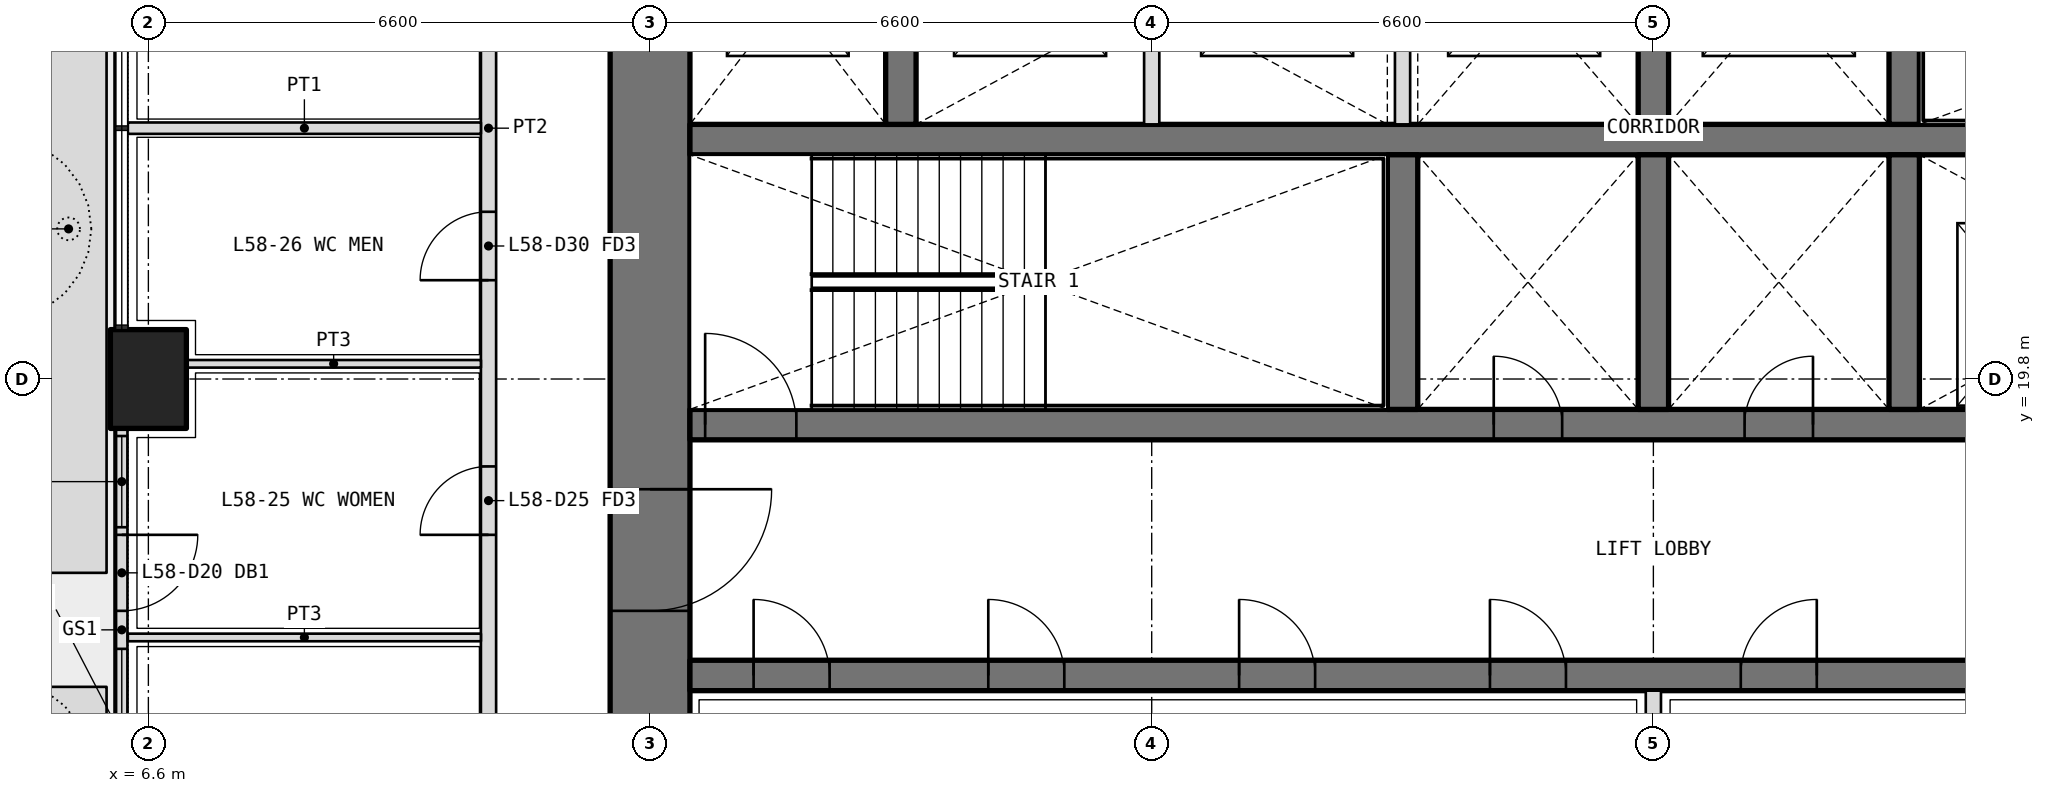
"""IFC4 building model, lengths in metres.
Left out: names, types, materials, properties, quantities, classifications, styles, units other than length and angle.
Written with IfcOpenShell. Run it as: python <this file> out.ifc"""

import sys

from ifc_helpers import new_model, si_unit, direction, frame, frame_2d, origin, origin_2d, place, context, subcontext, project, spatial, polyline, rectangle, outline, extrude, element, fill, save


model = new_model("IFC4")
c1 = context("Model", 3, precision=1e-05, world=origin(), true_north=direction((0.0, 1.0)))
c2 = subcontext(c1, "Body", "Model", "MODEL_VIEW")
j1 = project(units=[si_unit("LENGTHUNIT", "METRE"), si_unit("PLANEANGLEUNIT", "RADIAN")], contexts=[c1])
p1 = place(None, origin())
s1 = spatial("IfcSite", under=j1, at=p1, CompositionType="ELEMENT")
p2 = place(p1, origin())
s2 = spatial("IfcBuilding", under=s1, at=p2, CompositionType="ELEMENT")
p3 = place(p2, frame((0.0, 0.0, 254.4)))
s3 = spatial("IfcBuildingStorey", under=s2, at=p3, CompositionType="ELEMENT", Elevation=254.4)
p4 = place(p3, frame((6.6, 19.8, 0.0), z_axis=(0.0, 0.0, 1.0), x_axis=(0.0, 1.0, 0.0)))
e1 = element("IfcColumn", 1, at=p4, inside=s3, PredefinedType="COLUMN", context=c2, shape_type="SweptSolid", body=[
    extrude(rectangle(XDim=1.3, YDim=1.0, at=origin_2d()), origin(), (0.0, 0.0, 1.0), 4.2),
])
p5 = place(p3, origin())
e2 = element("IfcWall", 2, at=p5, inside=s3, PredefinedType="USERDEFINED", context=c2, shape_type="SweptSolid", body=[
    extrude(outline(polyline([(5.05, 13.3), (6.05, 13.3), (6.05, 15.75), (5.05, 15.75), (5.05, 13.3)]), holes=[polyline([(5.2, 13.45), (5.9, 13.45), (5.9, 15.6), (5.2, 15.6), (5.2, 13.45)])]), origin(), (0.0, 0.0, 1.0), 1.05),
])
p6 = place(p3, origin())
e3 = element("IfcWall", 3, at=p6, inside=s3, PredefinedType="USERDEFINED", context=c2, shape_type="SweptSolid", body=[
    extrude(outline(polyline([(5.05, 17.25), (6.05, 17.25), (6.05, 26.3), (5.05, 26.3), (5.05, 17.25)]), holes=[polyline([(5.2, 17.4), (5.9, 17.4), (5.9, 26.15), (5.2, 26.15), (5.2, 17.4)])]), origin(), (0.0, 0.0, 1.0), 1.05),
])
p7 = place(p3, frame((6.25, 19.15, 0.0), z_axis=(0.0, 0.0, 1.0), x_axis=(0.0, -1.0, 0.0)))
e4 = element("IfcWall", 4, at=p7, inside=s3, PredefinedType="SOLIDWALL", context=c2, shape_type="SweptSolid", body=[
    extrude(rectangle(XDim=5.3, YDim=0.15, at=frame_2d((2.65, 0.0))), origin(), (0.0, 0.0, 1.0), 2.7),
])
p8 = place(p7, frame((1.4, 0.0, 0.0)))
e5 = element("IfcOpeningElement", 5, at=p8, cuts=e4, PredefinedType="OPENING", context=c2, shape_type="SweptSolid", body=[
    extrude(rectangle(XDim=1.0, YDim=2.4, at=frame_2d((0.5, 1.2))), frame((0.0, 0.085, 0.0), z_axis=(0.0, -1.0, 0.0), x_axis=(1.0, 0.0, 0.0)), (0.0, 0.0, 1.0), 0.17),
])
p9 = place(p7, frame((0.1, 0.0, 0.1)))
e6 = element("IfcOpeningElement", 6, at=p9, cuts=e4, PredefinedType="OPENING", context=c2, shape_type="SweptSolid", body=[
    extrude(rectangle(XDim=1.2, YDim=2.3, at=frame_2d((0.6, 1.15))), frame((0.0, 0.085, 0.0), z_axis=(0.0, -1.0, 0.0), x_axis=(1.0, 0.0, 0.0)), (0.0, 0.0, 1.0), 0.17),
])
p10 = place(p7, frame((2.9, 0.0, 0.1)))
e7 = element("IfcOpeningElement", 7, at=p10, cuts=e4, PredefinedType="OPENING", context=c2, shape_type="SweptSolid", body=[
    extrude(rectangle(XDim=2.3, YDim=2.3, at=frame_2d((1.15, 1.15))), frame((0.0, 0.085, 0.0), z_axis=(0.0, -1.0, 0.0), x_axis=(1.0, 0.0, 0.0)), (0.0, 0.0, 1.0), 0.17),
])
p11 = place(p3, frame((13.2, 32.475, 0.0), z_axis=(0.0, 0.0, 1.0), x_axis=(0.0, -1.0, 0.0)))
e8 = element("IfcWall", 8, at=p11, inside=s3, PredefinedType="SHEAR", context=c2, shape_type="SweptSolid", body=[
    extrude(rectangle(XDim=18.75, YDim=1.05, at=frame_2d((9.375, 0.0))), origin(), (0.0, 0.0, 1.0), 4.2),
])
p12 = place(p11, frame((14.125, 0.0, 0.0)))
e9 = element("IfcOpeningElement", 9, at=p12, cuts=e8, PredefinedType="OPENING", context=c2, shape_type="SweptSolid", body=[
    extrude(rectangle(XDim=1.6, YDim=2.1, at=frame_2d((0.8, 1.05))), frame((0.0, 0.535, 0.0), z_axis=(0.0, -1.0, 0.0), x_axis=(1.0, 0.0, 0.0)), (0.0, 0.0, 1.0), 1.07),
])
p13 = place(p11, frame((3.325, 0.0, 0.0)))
e10 = element("IfcOpeningElement", 10, at=p13, cuts=e8, PredefinedType="OPENING", context=c2, shape_type="SweptSolid", body=[
    extrude(rectangle(XDim=1.6, YDim=2.1, at=frame_2d((0.8, 1.05))), frame((0.0, 0.535, 0.0), z_axis=(0.0, -1.0, 0.0), x_axis=(1.0, 0.0, 0.0)), (0.0, 0.0, 1.0), 1.07),
])
p14 = place(p3, frame((13.725, 15.9, 0.0), z_axis=(0.0, 0.0, 1.0), x_axis=(1.0, 0.0, 0.0)))
e11 = element("IfcWall", 11, at=p14, inside=s3, PredefinedType="SHEAR", context=c2, shape_type="SweptSolid", body=[
    extrude(rectangle(XDim=25.35, YDim=0.4, at=frame_2d((12.675, 0.0))), origin(), (0.0, 0.0, 1.0), 4.2),
])
p15 = place(p14, frame((0.837, 0.0, 0.0)))
e12 = element("IfcOpeningElement", 12, at=p15, cuts=e11, PredefinedType="OPENING", context=c2, shape_type="SweptSolid", body=[
    extrude(rectangle(XDim=1.0, YDim=2.1, at=frame_2d((0.5, 1.05))), frame((0.0, 0.21, 0.0), z_axis=(0.0, -1.0, 0.0), x_axis=(1.0, 0.0, 0.0)), (0.0, 0.0, 1.0), 0.42),
])
p16 = place(p14, frame((3.925, 0.0, 0.0)))
e13 = element("IfcOpeningElement", 13, at=p16, cuts=e11, PredefinedType="OPENING", context=c2, shape_type="SweptSolid", body=[
    extrude(rectangle(XDim=1.0, YDim=2.1, at=frame_2d((0.5, 1.05))), frame((0.0, 0.21, 0.0), z_axis=(0.0, -1.0, 0.0), x_axis=(1.0, 0.0, 0.0)), (0.0, 0.0, 1.0), 0.42),
])
p17 = place(p14, frame((7.225, 0.0, 0.0)))
e14 = element("IfcOpeningElement", 14, at=p17, cuts=e11, PredefinedType="OPENING", context=c2, shape_type="SweptSolid", body=[
    extrude(rectangle(XDim=1.0, YDim=2.1, at=frame_2d((0.5, 1.05))), frame((0.0, 0.21, 0.0), z_axis=(0.0, -1.0, 0.0), x_axis=(1.0, 0.0, 0.0)), (0.0, 0.0, 1.0), 0.42),
])
p18 = place(p14, frame((10.525, 0.0, 0.0)))
e15 = element("IfcOpeningElement", 15, at=p18, cuts=e11, PredefinedType="OPENING", context=c2, shape_type="SweptSolid", body=[
    extrude(rectangle(XDim=1.0, YDim=2.1, at=frame_2d((0.5, 1.05))), frame((0.0, 0.21, 0.0), z_axis=(0.0, -1.0, 0.0), x_axis=(1.0, 0.0, 0.0)), (0.0, 0.0, 1.0), 0.42),
])
p19 = place(p14, frame((13.825, 0.0, 0.0)))
e16 = element("IfcOpeningElement", 16, at=p19, cuts=e11, PredefinedType="OPENING", context=c2, shape_type="SweptSolid", body=[
    extrude(rectangle(XDim=1.0, YDim=2.1, at=frame_2d((0.5, 1.05))), frame((0.0, 0.21, 0.0), z_axis=(0.0, -1.0, 0.0), x_axis=(1.0, 0.0, 0.0)), (0.0, 0.0, 1.0), 0.42),
])
p20 = place(p14, frame((17.125, 0.0, 0.0)))
e17 = element("IfcOpeningElement", 17, at=p20, cuts=e11, PredefinedType="OPENING", context=c2, shape_type="SweptSolid", body=[
    extrude(rectangle(XDim=1.0, YDim=2.1, at=frame_2d((0.5, 1.05))), frame((0.0, 0.21, 0.0), z_axis=(0.0, -1.0, 0.0), x_axis=(1.0, 0.0, 0.0)), (0.0, 0.0, 1.0), 0.42),
])
p21 = place(p14, frame((20.425, 0.0, 0.0)))
e18 = element("IfcOpeningElement", 18, at=p21, cuts=e11, PredefinedType="OPENING", context=c2, shape_type="SweptSolid", body=[
    extrude(rectangle(XDim=1.0, YDim=2.1, at=frame_2d((0.5, 1.05))), frame((0.0, 0.21, 0.0), z_axis=(0.0, -1.0, 0.0), x_axis=(1.0, 0.0, 0.0)), (0.0, 0.0, 1.0), 0.42),
])
p22 = place(p14, frame((23.512, 0.0, 0.0)))
e19 = element("IfcOpeningElement", 19, at=p22, cuts=e11, PredefinedType="OPENING", context=c2, shape_type="SweptSolid", body=[
    extrude(rectangle(XDim=1.0, YDim=2.1, at=frame_2d((0.5, 1.05))), frame((0.0, 0.21, 0.0), z_axis=(0.0, -1.0, 0.0), x_axis=(1.0, 0.0, 0.0)), (0.0, 0.0, 1.0), 0.42),
])
p23 = place(p3, frame((13.725, 19.2, 0.0), z_axis=(0.0, 0.0, 1.0), x_axis=(1.0, 0.0, 0.0)))
e20 = element("IfcWall", 20, at=p23, inside=s3, PredefinedType="SHEAR", context=c2, shape_type="SweptSolid", body=[
    extrude(rectangle(XDim=25.35, YDim=0.4, at=frame_2d((12.675, 0.0))), origin(), (0.0, 0.0, 1.0), 4.2),
])
p24 = place(p23, frame((10.575, 0.0, 0.0)))
e21 = element("IfcOpeningElement", 21, at=p24, cuts=e20, PredefinedType="OPENING", context=c2, shape_type="SweptSolid", body=[
    extrude(rectangle(XDim=0.9, YDim=2.1, at=frame_2d((0.45, 1.05))), frame((0.0, 0.21, 0.0), z_axis=(0.0, -1.0, 0.0), x_axis=(1.0, 0.0, 0.0)), (0.0, 0.0, 1.0), 0.42),
])
p25 = place(p23, frame((13.875, 0.0, 0.0)))
e22 = element("IfcOpeningElement", 22, at=p25, cuts=e20, PredefinedType="OPENING", context=c2, shape_type="SweptSolid", body=[
    extrude(rectangle(XDim=0.9, YDim=2.1, at=frame_2d((0.45, 1.05))), frame((0.0, 0.21, 0.0), z_axis=(0.0, -1.0, 0.0), x_axis=(1.0, 0.0, 0.0)), (0.0, 0.0, 1.0), 0.42),
])
p26 = place(p23, frame((0.2, 0.0, 0.0)))
e23 = element("IfcOpeningElement", 23, at=p26, cuts=e20, PredefinedType="OPENING", context=c2, shape_type="SweptSolid", body=[
    extrude(rectangle(XDim=1.2, YDim=2.1, at=frame_2d((0.6, 1.05))), frame((0.0, 0.21, 0.0), z_axis=(0.0, -1.0, 0.0), x_axis=(1.0, 0.0, 0.0)), (0.0, 0.0, 1.0), 0.42),
])
p27 = place(p23, frame((23.512, 0.0, 0.0)))
e24 = element("IfcOpeningElement", 24, at=p27, cuts=e20, PredefinedType="OPENING", context=c2, shape_type="SweptSolid", body=[
    extrude(rectangle(XDim=1.1, YDim=2.1, at=frame_2d((0.55, 1.05))), frame((0.0, 0.21, 0.0), z_axis=(0.0, -1.0, 0.0), x_axis=(1.0, 0.0, 0.0)), (0.0, 0.0, 1.0), 0.42),
])
p28 = place(p23, frame((17.125, 0.0, 0.0)))
e25 = element("IfcOpeningElement", 25, at=p28, cuts=e20, PredefinedType="OPENING", context=c2, shape_type="SweptSolid", body=[
    extrude(rectangle(XDim=1.1, YDim=2.1, at=frame_2d((0.55, 1.05))), frame((0.0, 0.21, 0.0), z_axis=(0.0, -1.0, 0.0), x_axis=(1.0, 0.0, 0.0)), (0.0, 0.0, 1.0), 0.42),
])
p29 = place(p23, frame((20.325, 0.0, 0.0)))
e26 = element("IfcOpeningElement", 26, at=p29, cuts=e20, PredefinedType="OPENING", context=c2, shape_type="SweptSolid", body=[
    extrude(rectangle(XDim=1.1, YDim=2.1, at=frame_2d((0.55, 1.05))), frame((0.0, 0.21, 0.0), z_axis=(0.0, -1.0, 0.0), x_axis=(1.0, 0.0, 0.0)), (0.0, 0.0, 1.0), 0.42),
])
p30 = place(p3, frame((13.725, 22.95, 0.0), z_axis=(0.0, 0.0, 1.0), x_axis=(1.0, 0.0, 0.0)))
e27 = element("IfcWall", 27, at=p30, inside=s3, PredefinedType="SHEAR", context=c2, shape_type="SweptSolid", body=[
    extrude(rectangle(XDim=25.35, YDim=0.4, at=frame_2d((12.675, 0.0))), origin(), (0.0, 0.0, 1.0), 4.2),
])
for number, where, z_axis, x_axis in (
    (28, (23.1, 19.4, 0.0), (0.0, 0.0, 1.0), (0.0, 1.0, 0.0)),
    (29, (26.4, 19.4, 0.0), (0.0, 0.0, 1.0), (0.0, 1.0, 0.0)),
    (30, (29.7, 19.4, 0.0), (0.0, 0.0, 1.0), (0.0, 1.0, 0.0)),
    (31, (16.5, 23.15, 0.0), (0.0, 0.0, 1.0), (0.0, 1.0, 0.0)),
    (32, (26.4, 23.15, 0.0), (0.0, 0.0, 1.0), (0.0, 1.0, 0.0)),
    (33, (29.7, 23.15, 0.0), (0.0, 0.0, 1.0), (0.0, 1.0, 0.0)),
):
    element("IfcWall", number, at=place(p3, frame(where, z_axis=z_axis, x_axis=x_axis)), inside=s3, PredefinedType="SHEAR", context=c2, shape_type="SweptSolid", body=[
        extrude(rectangle(XDim=3.35, YDim=0.4, at=frame_2d((1.675, 0.0))), origin(), (0.0, 0.0, 1.0), 4.2),
    ])
p31 = place(p3, frame((26.4, 13.725, 0.0), z_axis=(0.0, 0.0, 1.0), x_axis=(0.0, 1.0, 0.0)))
e34 = element("IfcWall", 34, at=p31, inside=s3, PredefinedType="PARTITIONING", context=c2, shape_type="SweptSolid", body=[
    extrude(rectangle(XDim=1.975, YDim=0.2, at=frame_2d((0.987, 0.0))), origin(), (0.0, 0.0, 1.0), 4.2),
])
for number, where, z_axis, x_axis in (
    (35, (19.8, 23.15, 0.0), (0.0, 0.0, 1.0), (0.0, 1.0, 0.0)),
    (36, (23.1, 23.15, 0.0), (0.0, 0.0, 1.0), (0.0, 1.0, 0.0)),
):
    element("IfcWall", number, at=place(p3, frame(where, z_axis=z_axis, x_axis=x_axis)), inside=s3, PredefinedType="PARTITIONING", context=c2, shape_type="SweptSolid", body=[
        extrude(rectangle(XDim=3.35, YDim=0.2, at=frame_2d((1.675, 0.0))), origin(), (0.0, 0.0, 1.0), 4.2),
    ])
p32 = place(p3, frame((11.075, 7.4, 0.0), z_axis=(0.0, 0.0, 1.0), x_axis=(0.0, 1.0, 0.0)))
e37 = element("IfcWall", 37, at=p32, inside=s3, PredefinedType="PARTITIONING", context=c2, shape_type="SweptSolid", body=[
    extrude(rectangle(XDim=31.4, YDim=0.2, at=frame_2d((15.7, 0.0))), origin(), (0.0, 0.0, 1.0), 3.0),
])
p33 = place(p32, frame((2.35, 0.0, 0.0)))
e38 = element("IfcOpeningElement", 38, at=p33, cuts=e37, PredefinedType="OPENING", context=c2, shape_type="SweptSolid", body=[
    extrude(rectangle(XDim=1.0, YDim=2.1, at=frame_2d((0.5, 1.05))), frame((0.0, 0.11, 0.0), z_axis=(0.0, -1.0, 0.0), x_axis=(1.0, 0.0, 0.0)), (0.0, 0.0, 1.0), 0.22),
])
p34 = place(p32, frame((6.9, 0.0, 0.0)))
e39 = element("IfcOpeningElement", 39, at=p34, cuts=e37, PredefinedType="OPENING", context=c2, shape_type="SweptSolid", body=[
    extrude(rectangle(XDim=1.0, YDim=2.1, at=frame_2d((0.5, 1.05))), frame((0.0, 0.11, 0.0), z_axis=(0.0, -1.0, 0.0), x_axis=(1.0, 0.0, 0.0)), (0.0, 0.0, 1.0), 0.22),
])
p35 = place(p32, frame((10.35, 0.0, 0.0)))
e40 = element("IfcOpeningElement", 40, at=p35, cuts=e37, PredefinedType="OPENING", context=c2, shape_type="SweptSolid", body=[
    extrude(rectangle(XDim=0.9, YDim=2.1, at=frame_2d((0.45, 1.05))), frame((0.0, 0.11, 0.0), z_axis=(0.0, -1.0, 0.0), x_axis=(1.0, 0.0, 0.0)), (0.0, 0.0, 1.0), 0.22),
])
p36 = place(p32, frame((13.7, 0.0, 0.0)))
e41 = element("IfcOpeningElement", 41, at=p36, cuts=e37, PredefinedType="OPENING", context=c2, shape_type="SweptSolid", body=[
    extrude(rectangle(XDim=0.9, YDim=2.1, at=frame_2d((0.45, 1.05))), frame((0.0, 0.11, 0.0), z_axis=(0.0, -1.0, 0.0), x_axis=(1.0, 0.0, 0.0)), (0.0, 0.0, 1.0), 0.22),
])
p37 = place(p32, frame((16.85, 0.0, 0.0)))
e42 = element("IfcOpeningElement", 42, at=p37, cuts=e37, PredefinedType="OPENING", context=c2, shape_type="SweptSolid", body=[
    extrude(rectangle(XDim=1.0, YDim=2.1, at=frame_2d((0.5, 1.05))), frame((0.0, 0.11, 0.0), z_axis=(0.0, -1.0, 0.0), x_axis=(1.0, 0.0, 0.0)), (0.0, 0.0, 1.0), 0.22),
])
p38 = place(p32, frame((24.75, 0.0, 0.0)))
e43 = element("IfcOpeningElement", 43, at=p38, cuts=e37, PredefinedType="OPENING", context=c2, shape_type="SweptSolid", body=[
    extrude(rectangle(XDim=1.0, YDim=2.1, at=frame_2d((0.5, 1.05))), frame((0.0, 0.11, 0.0), z_axis=(0.0, -1.0, 0.0), x_axis=(1.0, 0.0, 0.0)), (0.0, 0.0, 1.0), 0.22),
])
p39 = place(p3, frame((6.33, 16.4, 0.0), z_axis=(0.0, 0.0, 1.0), x_axis=(1.0, 0.0, 0.0)))
e44 = element("IfcWall", 44, at=p39, inside=s3, PredefinedType="PARTITIONING", context=c2, shape_type="SweptSolid", body=[
    extrude(rectangle(XDim=4.645, YDim=0.1, at=frame_2d((2.323, 0.0))), origin(), (0.0, 0.0, 1.0), 2.7),
])
p40 = place(p3, frame((7.1, 20.0, 0.0), z_axis=(0.0, 0.0, 1.0), x_axis=(1.0, 0.0, 0.0)))
e45 = element("IfcWall", 45, at=p40, inside=s3, PredefinedType="PARTITIONING", context=c2, shape_type="SweptSolid", body=[
    extrude(rectangle(XDim=3.875, YDim=0.1, at=frame_2d((1.938, 0.0))), origin(), (0.0, 0.0, 1.0), 3.0),
])
p41 = place(p3, frame((6.33, 23.1, 0.0), z_axis=(0.0, 0.0, 1.0), x_axis=(1.0, 0.0, 0.0)))
e46 = element("IfcWall", 46, at=p41, inside=s3, PredefinedType="PARTITIONING", context=c2, shape_type="SweptSolid", body=[
    extrude(rectangle(XDim=4.645, YDim=0.15, at=frame_2d((2.323, 0.0))), origin(), (0.0, 0.0, 1.0), 2.7),
])
p42 = place(p8, origin())
e47 = element("IfcDoor", 47, at=p42, inside=s3, OperationType="SINGLE_SWING_LEFT", PredefinedType="DOOR", context=c2, shape_type="SweptSolid", body=[
    extrude(rectangle(XDim=1.0, YDim=2.4, at=frame_2d((0.5, 1.2))), frame((0.0, 0.025, 0.0), z_axis=(0.0, -1.0, 0.0), x_axis=(1.0, 0.0, 0.0)), (0.0, 0.0, 1.0), 0.05),
])
fill(e5, e47)
p43 = place(p9, origin())
e48 = element("IfcWindow", 48, at=p43, inside=s3, PartitioningType="SINGLE_PANEL", PredefinedType="WINDOW", context=c2, shape_type="SweptSolid", body=[
    extrude(rectangle(XDim=1.2, YDim=2.3, at=frame_2d((0.6, 1.15))), frame((0.0, 0.03, 0.0), z_axis=(0.0, -1.0, 0.0), x_axis=(1.0, 0.0, 0.0)), (0.0, 0.0, 1.0), 0.06),
])
fill(e6, e48)
p44 = place(p10, origin())
e49 = element("IfcWindow", 49, at=p44, inside=s3, PartitioningType="SINGLE_PANEL", PredefinedType="WINDOW", context=c2, shape_type="SweptSolid", body=[
    extrude(rectangle(XDim=2.3, YDim=2.3, at=frame_2d((1.15, 1.15))), frame((0.0, 0.03, 0.0), z_axis=(0.0, -1.0, 0.0), x_axis=(1.0, 0.0, 0.0)), (0.0, 0.0, 1.0), 0.06),
])
fill(e7, e49)
p45 = place(p35, origin())
e50 = element("IfcDoor", 50, at=p45, inside=s3, OperationType="SINGLE_SWING_LEFT", PredefinedType="DOOR", context=c2, shape_type="SweptSolid", body=[
    extrude(rectangle(XDim=0.9, YDim=2.1, at=frame_2d((0.45, 1.05))), frame((0.0, 0.025, 0.0), z_axis=(0.0, -1.0, 0.0), x_axis=(1.0, 0.0, 0.0)), (0.0, 0.0, 1.0), 0.05),
])
fill(e40, e50)
p46 = place(p36, origin())
e51 = element("IfcDoor", 51, at=p46, inside=s3, OperationType="SINGLE_SWING_LEFT", PredefinedType="DOOR", context=c2, shape_type="SweptSolid", body=[
    extrude(rectangle(XDim=0.9, YDim=2.1, at=frame_2d((0.45, 1.05))), frame((0.0, 0.025, 0.0), z_axis=(0.0, -1.0, 0.0), x_axis=(1.0, 0.0, 0.0)), (0.0, 0.0, 1.0), 0.05),
])
fill(e41, e51)
p47 = place(p24, origin())
e52 = element("IfcDoor", 52, at=p47, inside=s3, OperationType="SINGLE_SWING_LEFT", PredefinedType="DOOR", context=c2, shape_type="SweptSolid", body=[
    extrude(rectangle(XDim=0.9, YDim=2.1, at=frame_2d((0.45, 1.05))), frame((0.0, 0.025, 0.0), z_axis=(0.0, -1.0, 0.0), x_axis=(1.0, 0.0, 0.0)), (0.0, 0.0, 1.0), 0.05),
])
fill(e21, e52)
p48 = place(p25, origin())
e53 = element("IfcDoor", 53, at=p48, inside=s3, OperationType="SINGLE_SWING_RIGHT", PredefinedType="DOOR", context=c2, shape_type="SweptSolid", body=[
    extrude(rectangle(XDim=0.9, YDim=2.1, at=frame_2d((0.45, 1.05))), frame((0.0, 0.025, 0.0), z_axis=(0.0, -1.0, 0.0), x_axis=(1.0, 0.0, 0.0)), (0.0, 0.0, 1.0), 0.05),
])
fill(e22, e53)
p49 = place(p15, origin())
e54 = element("IfcDoor", 54, at=p49, inside=s3, OperationType="SINGLE_SWING_LEFT", PredefinedType="DOOR", context=c2, shape_type="SweptSolid", body=[
    extrude(rectangle(XDim=1.0, YDim=2.1, at=frame_2d((0.5, 1.05))), frame((0.0, 0.025, 0.0), z_axis=(0.0, -1.0, 0.0), x_axis=(1.0, 0.0, 0.0)), (0.0, 0.0, 1.0), 0.05),
])
fill(e12, e54)
p50 = place(p16, origin())
e55 = element("IfcDoor", 55, at=p50, inside=s3, OperationType="SINGLE_SWING_LEFT", PredefinedType="DOOR", context=c2, shape_type="SweptSolid", body=[
    extrude(rectangle(XDim=1.0, YDim=2.1, at=frame_2d((0.5, 1.05))), frame((0.0, 0.025, 0.0), z_axis=(0.0, -1.0, 0.0), x_axis=(1.0, 0.0, 0.0)), (0.0, 0.0, 1.0), 0.05),
])
fill(e13, e55)
p51 = place(p17, origin())
e56 = element("IfcDoor", 56, at=p51, inside=s3, OperationType="SINGLE_SWING_LEFT", PredefinedType="DOOR", context=c2, shape_type="SweptSolid", body=[
    extrude(rectangle(XDim=1.0, YDim=2.1, at=frame_2d((0.5, 1.05))), frame((0.0, 0.025, 0.0), z_axis=(0.0, -1.0, 0.0), x_axis=(1.0, 0.0, 0.0)), (0.0, 0.0, 1.0), 0.05),
])
fill(e14, e56)
p52 = place(p18, origin())
e57 = element("IfcDoor", 57, at=p52, inside=s3, OperationType="SINGLE_SWING_LEFT", PredefinedType="DOOR", context=c2, shape_type="SweptSolid", body=[
    extrude(rectangle(XDim=1.0, YDim=2.1, at=frame_2d((0.5, 1.05))), frame((0.0, 0.025, 0.0), z_axis=(0.0, -1.0, 0.0), x_axis=(1.0, 0.0, 0.0)), (0.0, 0.0, 1.0), 0.05),
])
fill(e15, e57)
p53 = place(p19, origin())
e58 = element("IfcDoor", 58, at=p53, inside=s3, OperationType="SINGLE_SWING_RIGHT", PredefinedType="DOOR", context=c2, shape_type="SweptSolid", body=[
    extrude(rectangle(XDim=1.0, YDim=2.1, at=frame_2d((0.5, 1.05))), frame((0.0, 0.025, 0.0), z_axis=(0.0, -1.0, 0.0), x_axis=(1.0, 0.0, 0.0)), (0.0, 0.0, 1.0), 0.05),
])
fill(e16, e58)
p54 = place(p26, origin())
e59 = element("IfcDoor", 59, at=p54, inside=s3, OperationType="SINGLE_SWING_LEFT", PredefinedType="DOOR", context=c2, shape_type="SweptSolid", body=[
    extrude(rectangle(XDim=1.2, YDim=2.1, at=frame_2d((0.6, 1.05))), frame((0.0, 0.025, 0.0), z_axis=(0.0, -1.0, 0.0), x_axis=(1.0, 0.0, 0.0)), (0.0, 0.0, 1.0), 0.05),
])
fill(e23, e59)
p55 = place(p12, origin())
e60 = element("IfcDoor", 60, at=p55, inside=s3, OperationType="DOUBLE_DOOR_DOUBLE_SWING", PredefinedType="DOOR", context=c2, shape_type="SweptSolid", body=[
    extrude(rectangle(XDim=1.6, YDim=2.1, at=frame_2d((0.8, 1.05))), frame((0.0, 0.025, 0.0), z_axis=(0.0, -1.0, 0.0), x_axis=(1.0, 0.0, 0.0)), (0.0, 0.0, 1.0), 0.05),
])
fill(e9, e60)
save(model, sys.argv[1])
